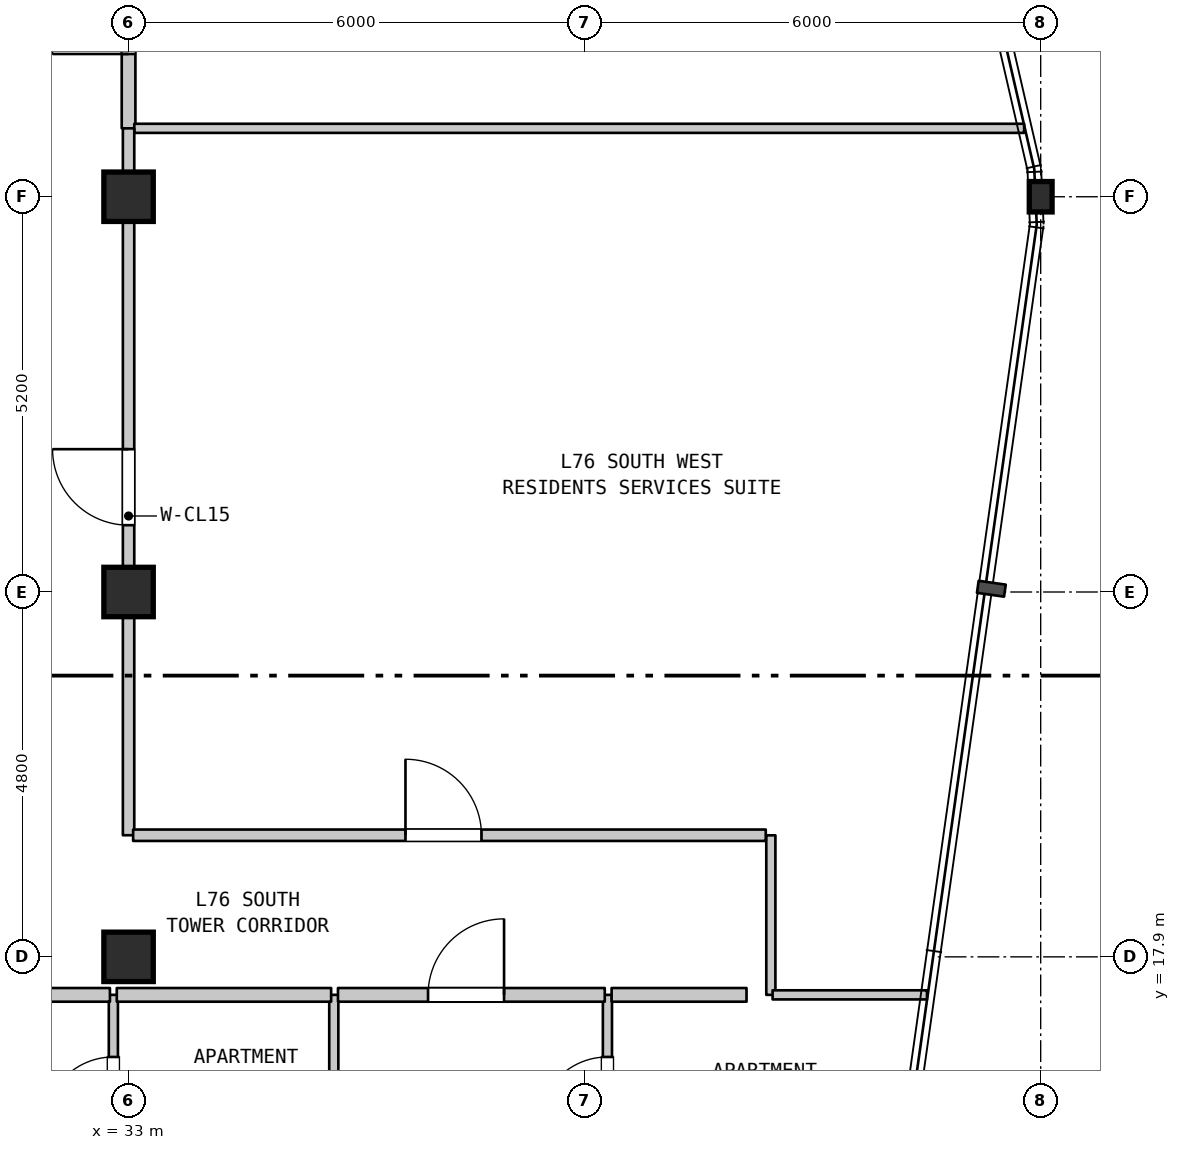
"""IFC4 building model, lengths in metres.
Left out: names, types, materials, properties, quantities, classifications, styles, units other than length and angle.
Written with IfcOpenShell. Run it as: python <this file> out.ifc"""

import sys

from ifc_helpers import new_model, si_unit, direction, frame, frame_2d, origin, origin_2d, place, context, subcontext, project, spatial, rectangle, i_section, extrude, element, fill, save


model = new_model("IFC4")
c1 = context("Model", 3, precision=1e-05, world=origin(), true_north=direction((0.0, 1.0)))
c2 = subcontext(c1, "Body", "Model", "MODEL_VIEW")
j1 = project(units=[si_unit("LENGTHUNIT", "METRE"), si_unit("PLANEANGLEUNIT", "RADIAN")], contexts=[c1])
p1 = place(None, origin())
s1 = spatial("IfcSite", under=j1, at=p1, CompositionType="ELEMENT")
p2 = place(p1, origin())
s2 = spatial("IfcBuilding", under=s1, at=p2, CompositionType="ELEMENT")
p3 = place(p2, frame((0.0, 0.0, 303.6)))
s3 = spatial("IfcBuildingStorey", under=s2, at=p3, CompositionType="ELEMENT", Elevation=303.6)
for number, where, z_axis, x_axis in (
    (1, (33.0, 17.9, 0.0), (0.0, 0.0, 1.0), (1.0, 0.0, 0.0)),
    (2, (33.0, 22.7, 0.0), (0.0, 0.0, 1.0), (1.0, 0.0, 0.0)),
    (3, (33.0, 27.9, 0.0), (0.0, 0.0, 1.0), (1.0, 0.0, 0.0)),
):
    element("IfcColumn", number, at=place(p3, frame(where, z_axis=z_axis, x_axis=x_axis)), inside=s3, PredefinedType="COLUMN", context=c2, shape_type="SweptSolid", body=[
        extrude(rectangle(XDim=0.65, YDim=0.65, at=origin_2d()), origin(), (0.0, 0.0, 1.0), 3.7),
    ])
p4 = place(p3, frame((45.0, 27.9, 0.0), z_axis=(0.0, 0.0, 1.0), x_axis=(1.0, 0.0, 0.0)))
e4 = element("IfcColumn", 4, at=p4, inside=s3, PredefinedType="COLUMN", context=c2, shape_type="SweptSolid", body=[
    extrude(i_section(OverallWidth=0.3, OverallDepth=0.4, WebThickness=0.013, FlangeThickness=0.024, FilletRadius=0.027, at=origin_2d()), origin(), (0.0, 0.0, 1.0), 3.7),
])
p5 = place(p3, frame((32.8, 15.008, 0.0), z_axis=(0.0, 0.0, 1.0), x_axis=(0.0, 1.0, 0.0)))
e5 = element("IfcWall", 5, at=p5, inside=s3, PredefinedType="PARTITIONING", context=c2, shape_type="SweptSolid", body=[
    extrude(rectangle(XDim=2.392, YDim=0.12, at=frame_2d((1.196, 0.0))), origin(), (0.0, 0.0, 1.0), 3.39),
])
p6 = place(p5, frame((0.675, 0.0, 0.0)))
e6 = element("IfcOpeningElement", 6, at=p6, cuts=e5, PredefinedType="OPENING", context=c2, shape_type="SweptSolid", body=[
    extrude(rectangle(XDim=0.9, YDim=2.1, at=frame_2d((0.45, 1.05))), frame((0.0, 0.07, 0.0), z_axis=(0.0, -1.0, 0.0), x_axis=(1.0, 0.0, 0.0)), (0.0, 0.0, 1.0), 0.14),
])
p7 = place(p3, frame((33.0, 19.5, 0.0), z_axis=(0.0, 0.0, 1.0), x_axis=(0.0, 1.0, 0.0)))
e7 = element("IfcWall", 7, at=p7, inside=s3, PredefinedType="STANDARD", context=c2, shape_type="SweptSolid", body=[
    extrude(rectangle(XDim=8.4, YDim=0.15, at=frame_2d((4.2, 0.0))), origin(), (0.0, 0.0, 1.0), 3.1),
])
p8 = place(p7, frame((4.079, 0.0, 0.0)))
e8 = element("IfcOpeningElement", 8, at=p8, cuts=e7, PredefinedType="OPENING", context=c2, shape_type="SweptSolid", body=[
    extrude(rectangle(XDim=1.0, YDim=2.15, at=frame_2d((0.5, 1.075))), frame((0.0, 0.085, 0.0), z_axis=(0.0, -1.0, 0.0), x_axis=(1.0, 0.0, 0.0)), (0.0, 0.0, 1.0), 0.17),
])
p9 = place(p3, frame((33.0, 28.8, 0.0), z_axis=(0.0, 0.0, 1.0), x_axis=(0.0, 1.0, 0.0)))
e9 = element("IfcWall", 9, at=p9, inside=s3, PredefinedType="STANDARD", context=c2, shape_type="SweptSolid", body=[
    extrude(rectangle(XDim=3.1, YDim=0.18, at=frame_2d((1.55, 0.0))), origin(), (0.0, 0.0, 1.0), 2.89),
])
p10 = place(p9, frame((0.978, 0.0, 0.0)))
e10 = element("IfcOpeningElement", 10, at=p10, cuts=e9, PredefinedType="OPENING", context=c2, shape_type="SweptSolid", body=[
    extrude(rectangle(XDim=1.0, YDim=2.15, at=frame_2d((0.5, 1.075))), frame((0.0, 0.1, 0.0), z_axis=(0.0, -1.0, 0.0), x_axis=(1.0, 0.0, 0.0)), (0.0, 0.0, 1.0), 0.2),
])
p11 = place(p3, frame((35.7, 15.008, 0.0), z_axis=(0.0, 0.0, 1.0), x_axis=(0.0, 1.0, 0.0)))
e11 = element("IfcWall", 11, at=p11, inside=s3, PredefinedType="PARTITIONING", context=c2, shape_type="SweptSolid", body=[
    extrude(rectangle(XDim=2.392, YDim=0.12, at=frame_2d((1.196, 0.0))), origin(), (0.0, 0.0, 1.0), 3.39),
])
p12 = place(p3, frame((39.3, 15.008, 0.0), z_axis=(0.0, 0.0, 1.0), x_axis=(0.0, 1.0, 0.0)))
e12 = element("IfcWall", 12, at=p12, inside=s3, PredefinedType="PARTITIONING", context=c2, shape_type="SweptSolid", body=[
    extrude(rectangle(XDim=2.392, YDim=0.12, at=frame_2d((1.196, 0.0))), origin(), (0.0, 0.0, 1.0), 3.39),
])
p13 = place(p12, frame((0.675, 0.0, 0.0)))
e13 = element("IfcOpeningElement", 13, at=p13, cuts=e12, PredefinedType="OPENING", context=c2, shape_type="SweptSolid", body=[
    extrude(rectangle(XDim=0.9, YDim=2.1, at=frame_2d((0.45, 1.05))), frame((0.0, 0.07, 0.0), z_axis=(0.0, -1.0, 0.0), x_axis=(1.0, 0.0, 0.0)), (0.0, 0.0, 1.0), 0.14),
])
p14 = place(p3, frame((41.45, 17.4, 0.0), z_axis=(0.0, 0.0, 1.0), x_axis=(0.0, 1.0, 0.0)))
e14 = element("IfcWall", 14, at=p14, inside=s3, PredefinedType="PARTITIONING", context=c2, shape_type="SweptSolid", body=[
    extrude(rectangle(XDim=2.099, YDim=0.12, at=frame_2d((1.05, 0.0))), origin(), (0.0, 0.0, 1.0), 3.39),
])
p15 = place(p3, frame((29.245, 17.4, 0.0), z_axis=(0.0, 0.0, 1.0), x_axis=(1.0, 0.0, 0.0)))
e15 = element("IfcWall", 15, at=p15, inside=s3, PredefinedType="STANDARD", context=c2, shape_type="SweptSolid", body=[
    extrude(rectangle(XDim=3.51, YDim=0.18, at=frame_2d((1.755, 0.0))), origin(), (0.0, 0.0, 1.0), 3.39),
])
p16 = place(p15, frame((1.255, 0.0, 0.0)))
e16 = element("IfcOpeningElement", 16, at=p16, cuts=e15, PredefinedType="OPENING", context=c2, shape_type="SweptSolid", body=[
    extrude(rectangle(XDim=1.0, YDim=2.15, at=frame_2d((0.5, 1.075))), frame((0.0, 0.1, 0.0), z_axis=(0.0, -1.0, 0.0), x_axis=(1.0, 0.0, 0.0)), (0.0, 0.0, 1.0), 0.2),
])
p17 = place(p3, frame((32.845, 17.4, 0.0), z_axis=(0.0, 0.0, 1.0), x_axis=(1.0, 0.0, 0.0)))
e17 = element("IfcWall", 17, at=p17, inside=s3, PredefinedType="STANDARD", context=c2, shape_type="SweptSolid", body=[
    extrude(rectangle(XDim=2.82, YDim=0.18, at=frame_2d((1.41, 0.0))), origin(), (0.0, 0.0, 1.0), 3.39),
])
p18 = place(p3, frame((35.755, 17.4, 0.0), z_axis=(0.0, 0.0, 1.0), x_axis=(1.0, 0.0, 0.0)))
e18 = element("IfcWall", 18, at=p18, inside=s3, PredefinedType="STANDARD", context=c2, shape_type="SweptSolid", body=[
    extrude(rectangle(XDim=3.51, YDim=0.18, at=frame_2d((1.755, 0.0))), origin(), (0.0, 0.0, 1.0), 3.39),
])
p19 = place(p18, frame((1.185, 0.0, 0.0)))
e19 = element("IfcOpeningElement", 19, at=p19, cuts=e18, PredefinedType="OPENING", context=c2, shape_type="SweptSolid", body=[
    extrude(rectangle(XDim=1.0, YDim=2.15, at=frame_2d((0.5, 1.075))), frame((0.0, 0.1, 0.0), z_axis=(0.0, -1.0, 0.0), x_axis=(1.0, 0.0, 0.0)), (0.0, 0.0, 1.0), 0.2),
])
p20 = place(p3, frame((39.355, 17.4, 0.0), z_axis=(0.0, 0.0, 1.0), x_axis=(1.0, 0.0, 0.0)))
e20 = element("IfcWall", 20, at=p20, inside=s3, PredefinedType="STANDARD", context=c2, shape_type="SweptSolid", body=[
    extrude(rectangle(XDim=1.775, YDim=0.18, at=frame_2d((0.887, 0.0))), origin(), (0.0, 0.0, 1.0), 3.39),
])
p21 = place(p3, frame((41.473, 17.4, 0.0), z_axis=(0.0, 0.0, 1.0), x_axis=(1.0, 0.0, 0.0)))
e21 = element("IfcWall", 21, at=p21, inside=s3, PredefinedType="PARTITIONING", context=c2, shape_type="SweptSolid", body=[
    extrude(rectangle(XDim=2.031, YDim=0.12, at=frame_2d((1.016, 0.0))), origin(), (0.0, 0.0, 1.0), 3.39),
])
p22 = place(p3, frame((33.06, 19.5, 0.0), z_axis=(0.0, 0.0, 1.0), x_axis=(1.0, 0.0, 0.0)))
e22 = element("IfcWall", 22, at=p22, inside=s3, PredefinedType="STANDARD", context=c2, shape_type="SweptSolid", body=[
    extrude(rectangle(XDim=8.323, YDim=0.15, at=frame_2d((4.162, 0.0))), origin(), (0.0, 0.0, 1.0), 3.39),
])
p23 = place(p22, frame((3.583, 0.0, 0.0)))
e23 = element("IfcOpeningElement", 23, at=p23, cuts=e22, PredefinedType="OPENING", context=c2, shape_type="SweptSolid", body=[
    extrude(rectangle(XDim=1.0, YDim=2.15, at=frame_2d((0.5, 1.075))), frame((0.0, 0.085, 0.0), z_axis=(0.0, -1.0, 0.0), x_axis=(1.0, 0.0, 0.0)), (0.0, 0.0, 1.0), 0.17),
])
p24 = place(p3, frame((33.075, 28.8, 0.0), z_axis=(0.0, 0.0, 1.0), x_axis=(1.0, 0.0, 0.0)))
e24 = element("IfcWall", 24, at=p24, inside=s3, PredefinedType="PARTITIONING", context=c2, shape_type="SweptSolid", body=[
    extrude(rectangle(XDim=11.707, YDim=0.12, at=frame_2d((5.854, 0.0))), origin(), (0.0, 0.0, 1.0), 3.39),
])
p25 = place(p3, frame((33.0, 27.9, 0.0), z_axis=(0.0, 0.0, 1.0), x_axis=(0.0, 1.0, 0.0)))
e25 = element("IfcWall", 25, at=p25, inside=s3, PredefinedType="STANDARD", context=c2, shape_type="SweptSolid", body=[
    extrude(rectangle(XDim=0.9, YDim=0.15, at=frame_2d((0.45, 0.0))), origin(), (0.0, 0.0, 1.0), 2.89),
])
p26 = place(p6, origin())
e26 = element("IfcDoor", 26, at=p26, inside=s3, OperationType="SINGLE_SWING_LEFT", PredefinedType="DOOR", context=c2, shape_type="SweptSolid", body=[
    extrude(rectangle(XDim=0.9, YDim=2.1, at=frame_2d((0.45, 1.05))), frame((0.0, 0.025, 0.0), z_axis=(0.0, -1.0, 0.0), x_axis=(1.0, 0.0, 0.0)), (0.0, 0.0, 1.0), 0.05),
])
fill(e6, e26)
p27 = place(p8, origin())
e27 = element("IfcDoor", 27, at=p27, inside=s3, OperationType="SINGLE_SWING_RIGHT", PredefinedType="DOOR", context=c2, shape_type="SweptSolid", body=[
    extrude(rectangle(XDim=1.0, YDim=2.15, at=frame_2d((0.5, 1.075))), frame((0.0, 0.025, 0.0), z_axis=(0.0, -1.0, 0.0), x_axis=(1.0, 0.0, 0.0)), (0.0, 0.0, 1.0), 0.05),
])
fill(e8, e27)
p28 = place(p10, origin())
e28 = element("IfcDoor", 28, at=p28, inside=s3, OperationType="SINGLE_SWING_LEFT", PredefinedType="DOOR", context=c2, shape_type="SweptSolid", body=[
    extrude(rectangle(XDim=1.0, YDim=2.15, at=frame_2d((0.5, 1.075))), frame((0.0, 0.025, 0.0), z_axis=(0.0, -1.0, 0.0), x_axis=(1.0, 0.0, 0.0)), (0.0, 0.0, 1.0), 0.05),
])
fill(e10, e28)
p29 = place(p13, origin())
e29 = element("IfcDoor", 29, at=p29, inside=s3, OperationType="SINGLE_SWING_LEFT", PredefinedType="DOOR", context=c2, shape_type="SweptSolid", body=[
    extrude(rectangle(XDim=0.9, YDim=2.1, at=frame_2d((0.45, 1.05))), frame((0.0, 0.025, 0.0), z_axis=(0.0, -1.0, 0.0), x_axis=(1.0, 0.0, 0.0)), (0.0, 0.0, 1.0), 0.05),
])
fill(e13, e29)
p30 = place(p19, origin())
e30 = element("IfcDoor", 30, at=p30, inside=s3, OperationType="SINGLE_SWING_RIGHT", PredefinedType="DOOR", context=c2, shape_type="SweptSolid", body=[
    extrude(rectangle(XDim=1.0, YDim=2.15, at=frame_2d((0.5, 1.075))), frame((0.0, 0.025, 0.0), z_axis=(0.0, -1.0, 0.0), x_axis=(1.0, 0.0, 0.0)), (0.0, 0.0, 1.0), 0.05),
])
fill(e19, e30)
p31 = place(p23, origin())
e31 = element("IfcDoor", 31, at=p31, inside=s3, OperationType="SINGLE_SWING_LEFT", PredefinedType="DOOR", context=c2, shape_type="SweptSolid", body=[
    extrude(rectangle(XDim=1.0, YDim=2.15, at=frame_2d((0.5, 1.075))), frame((0.0, 0.025, 0.0), z_axis=(0.0, -1.0, 0.0), x_axis=(1.0, 0.0, 0.0)), (0.0, 0.0, 1.0), 0.05),
])
fill(e23, e31)
save(model, sys.argv[1])
